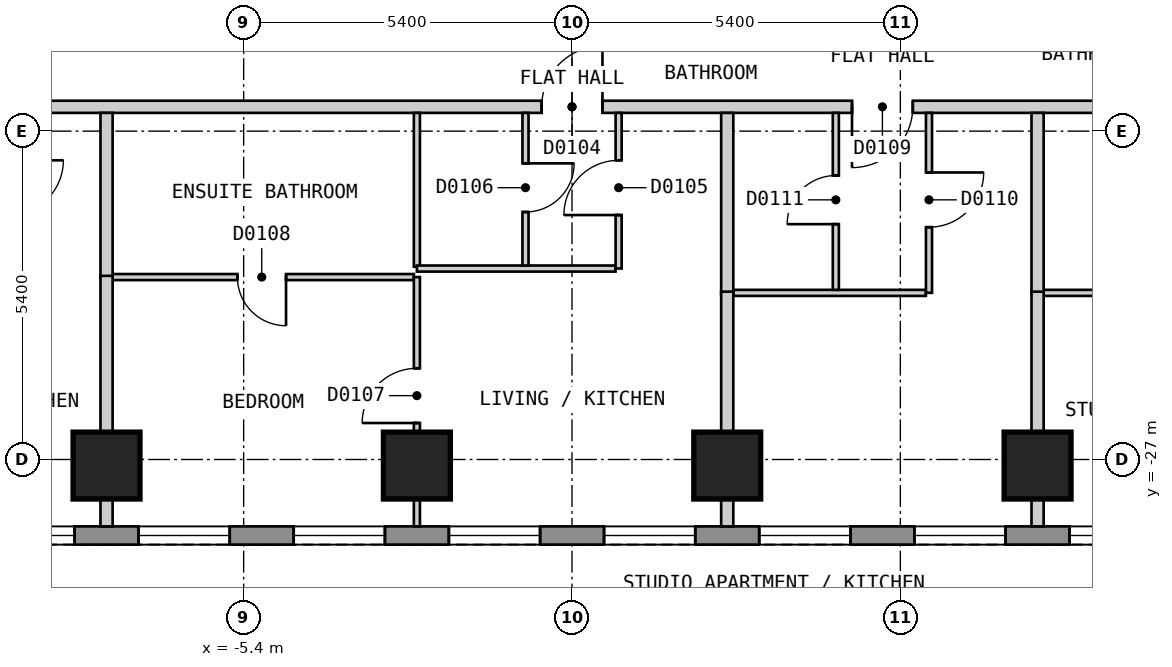
"""IFC4 building model, lengths in metres.
Left out: names, types, materials, properties, quantities, classifications, styles, units other than length and angle.
Written with IfcOpenShell. Run it as: python <this file> out.ifc"""

import sys

from ifc_helpers import new_model, si_unit, direction, frame, frame_2d, origin, origin_2d, place, context, subcontext, project, spatial, polyline, rectangle, outline, extrude, element, fill, save


model = new_model("IFC4")
c1 = context("Model", 3, precision=1e-05, world=origin(), true_north=direction((0.0, 1.0)))
c2 = subcontext(c1, "Body", "Model", "MODEL_VIEW")
j1 = project(units=[si_unit("LENGTHUNIT", "METRE"), si_unit("PLANEANGLEUNIT", "RADIAN")], contexts=[c1])
p1 = place(None, origin())
s1 = spatial("IfcSite", under=j1, at=p1, CompositionType="ELEMENT")
p2 = place(p1, origin())
s2 = spatial("IfcBuilding", under=s1, at=p2, CompositionType="ELEMENT")
p3 = place(p2, frame((0.0, 0.0, 29.4)))
s3 = spatial("IfcBuildingStorey", under=s2, at=p3, CompositionType="ELEMENT", Elevation=29.4)
for number, where, z_axis, x_axis in (
    (1, (-7.655, -27.1, 0.0), (0.0, 0.0, 1.0), (1.0, 0.0, 0.0)),
    (2, (-2.551, -27.1, 0.0), (0.0, 0.0, 1.0), (1.0, 0.0, 0.0)),
    (3, (2.553, -27.1, 0.0), (0.0, 0.0, 1.0), (1.0, 0.0, 0.0)),
    (4, (7.657, -27.1, 0.0), (0.0, 0.0, 1.0), (1.0, 0.0, 0.0)),
):
    element("IfcColumn", number, at=place(p3, frame(where, z_axis=z_axis, x_axis=x_axis)), inside=s3, PredefinedType="COLUMN", context=c2, shape_type="SweptSolid", body=[
        extrude(rectangle(XDim=1.1, YDim=1.1, at=origin_2d()), origin(), (0.0, 0.0, 1.0), 3.0),
    ])
p4 = place(p3, frame((-13.51, -28.25, 0.0), z_axis=(0.0, 0.0, 1.0), x_axis=(1.0, 0.0, 0.0)))
e5 = element("IfcWall", 5, at=p4, inside=s3, PredefinedType="SOLIDWALL", context=c2, shape_type="SweptSolid", body=[
    extrude(outline(polyline([(0.0, -0.15), (27.02, -0.15), (26.94, 0.15), (0.08, 0.15), (0.0, -0.15)])), origin(), (0.0, 0.0, 1.0), 2.7),
])
p5 = place(p4, frame((1.277, 0.0, 0.15)))
e6 = element("IfcOpeningElement", 6, at=p5, cuts=e5, PredefinedType="OPENING", context=c2, shape_type="SweptSolid", body=[
    extrude(rectangle(XDim=1.5, YDim=2.1, at=frame_2d((0.75, 1.05))), frame((0.0, 0.16, 0.0), z_axis=(0.0, -1.0, 0.0), x_axis=(1.0, 0.0, 0.0)), (0.0, 0.0, 1.0), 0.32),
])
p6 = place(p4, frame((3.829, 0.0, 0.15)))
e7 = element("IfcOpeningElement", 7, at=p6, cuts=e5, PredefinedType="OPENING", context=c2, shape_type="SweptSolid", body=[
    extrude(rectangle(XDim=1.5, YDim=2.1, at=frame_2d((0.75, 1.05))), frame((0.0, 0.16, 0.0), z_axis=(0.0, -1.0, 0.0), x_axis=(1.0, 0.0, 0.0)), (0.0, 0.0, 1.0), 0.32),
])
p7 = place(p4, frame((6.381, 0.0, 0.15)))
e8 = element("IfcOpeningElement", 8, at=p7, cuts=e5, PredefinedType="OPENING", context=c2, shape_type="SweptSolid", body=[
    extrude(rectangle(XDim=1.5, YDim=2.1, at=frame_2d((0.75, 1.05))), frame((0.0, 0.16, 0.0), z_axis=(0.0, -1.0, 0.0), x_axis=(1.0, 0.0, 0.0)), (0.0, 0.0, 1.0), 0.32),
])
p8 = place(p4, frame((8.933, 0.0, 0.15)))
e9 = element("IfcOpeningElement", 9, at=p8, cuts=e5, PredefinedType="OPENING", context=c2, shape_type="SweptSolid", body=[
    extrude(rectangle(XDim=1.5, YDim=2.1, at=frame_2d((0.75, 1.05))), frame((0.0, 0.16, 0.0), z_axis=(0.0, -1.0, 0.0), x_axis=(1.0, 0.0, 0.0)), (0.0, 0.0, 1.0), 0.32),
])
p9 = place(p4, frame((11.485, 0.0, 0.15)))
e10 = element("IfcOpeningElement", 10, at=p9, cuts=e5, PredefinedType="OPENING", context=c2, shape_type="SweptSolid", body=[
    extrude(rectangle(XDim=1.5, YDim=2.1, at=frame_2d((0.75, 1.05))), frame((0.0, 0.16, 0.0), z_axis=(0.0, -1.0, 0.0), x_axis=(1.0, 0.0, 0.0)), (0.0, 0.0, 1.0), 0.32),
])
p10 = place(p4, frame((14.037, 0.0, 0.15)))
e11 = element("IfcOpeningElement", 11, at=p10, cuts=e5, PredefinedType="OPENING", context=c2, shape_type="SweptSolid", body=[
    extrude(rectangle(XDim=1.5, YDim=2.1, at=frame_2d((0.75, 1.05))), frame((0.0, 0.16, 0.0), z_axis=(0.0, -1.0, 0.0), x_axis=(1.0, 0.0, 0.0)), (0.0, 0.0, 1.0), 0.32),
])
p11 = place(p4, frame((16.589, 0.0, 0.15)))
e12 = element("IfcOpeningElement", 12, at=p11, cuts=e5, PredefinedType="OPENING", context=c2, shape_type="SweptSolid", body=[
    extrude(rectangle(XDim=1.5, YDim=2.1, at=frame_2d((0.75, 1.05))), frame((0.0, 0.16, 0.0), z_axis=(0.0, -1.0, 0.0), x_axis=(1.0, 0.0, 0.0)), (0.0, 0.0, 1.0), 0.32),
])
p12 = place(p4, frame((19.141, 0.0, 0.15)))
e13 = element("IfcOpeningElement", 13, at=p12, cuts=e5, PredefinedType="OPENING", context=c2, shape_type="SweptSolid", body=[
    extrude(rectangle(XDim=1.5, YDim=2.1, at=frame_2d((0.75, 1.05))), frame((0.0, 0.16, 0.0), z_axis=(0.0, -1.0, 0.0), x_axis=(1.0, 0.0, 0.0)), (0.0, 0.0, 1.0), 0.32),
])
p13 = place(p4, frame((21.693, 0.0, 0.15)))
e14 = element("IfcOpeningElement", 14, at=p13, cuts=e5, PredefinedType="OPENING", context=c2, shape_type="SweptSolid", body=[
    extrude(rectangle(XDim=1.5, YDim=2.1, at=frame_2d((0.75, 1.05))), frame((0.0, 0.16, 0.0), z_axis=(0.0, -1.0, 0.0), x_axis=(1.0, 0.0, 0.0)), (0.0, 0.0, 1.0), 0.32),
])
p14 = place(p4, frame((24.245, 0.0, 0.15)))
e15 = element("IfcOpeningElement", 15, at=p14, cuts=e5, PredefinedType="OPENING", context=c2, shape_type="SweptSolid", body=[
    extrude(rectangle(XDim=1.5, YDim=2.1, at=frame_2d((0.75, 1.05))), frame((0.0, 0.16, 0.0), z_axis=(0.0, -1.0, 0.0), x_axis=(1.0, 0.0, 0.0)), (0.0, 0.0, 1.0), 0.32),
])
p15 = place(p3, frame((-15.4, -21.2, 0.0), z_axis=(0.0, 0.0, 1.0), x_axis=(1.0, 0.0, 0.0)))
e16 = element("IfcWall", 16, at=p15, inside=s3, PredefinedType="PARTITIONING", context=c2, shape_type="SweptSolid", body=[
    extrude(rectangle(XDim=30.799, YDim=0.2, at=frame_2d((15.399, 0.0))), origin(), (0.0, 0.0, 1.0), 2.7),
])
p16 = place(p15, frame((4.985, 0.0, 0.0)))
e17 = element("IfcOpeningElement", 17, at=p16, cuts=e16, PredefinedType="OPENING", context=c2, shape_type="SweptSolid", body=[
    extrude(rectangle(XDim=0.9, YDim=2.1, at=frame_2d((0.45, 1.05))), frame((0.0, 0.11, 0.0), z_axis=(0.0, -1.0, 0.0), x_axis=(1.0, 0.0, 0.0)), (0.0, 0.0, 1.0), 0.22),
])
p17 = place(p15, frame((14.901, 0.0, 0.0)))
e18 = element("IfcOpeningElement", 18, at=p17, cuts=e16, PredefinedType="OPENING", context=c2, shape_type="SweptSolid", body=[
    extrude(rectangle(XDim=1.0, YDim=2.1, at=frame_2d((0.5, 1.05))), frame((0.0, 0.11, 0.0), z_axis=(0.0, -1.0, 0.0), x_axis=(1.0, 0.0, 0.0)), (0.0, 0.0, 1.0), 0.22),
])
p18 = place(p15, frame((20.005, 0.0, 0.0)))
e19 = element("IfcOpeningElement", 19, at=p18, cuts=e16, PredefinedType="OPENING", context=c2, shape_type="SweptSolid", body=[
    extrude(rectangle(XDim=1.0, YDim=2.1, at=frame_2d((0.5, 1.05))), frame((0.0, 0.11, 0.0), z_axis=(0.0, -1.0, 0.0), x_axis=(1.0, 0.0, 0.0)), (0.0, 0.0, 1.0), 0.22),
])
p19 = place(p15, frame((24.916, 0.0, 0.0)))
e20 = element("IfcOpeningElement", 20, at=p19, cuts=e16, PredefinedType="OPENING", context=c2, shape_type="SweptSolid", body=[
    extrude(rectangle(XDim=0.9, YDim=2.1, at=frame_2d((0.45, 1.05))), frame((0.0, 0.11, 0.0), z_axis=(0.0, -1.0, 0.0), x_axis=(1.0, 0.0, 0.0)), (0.0, 0.0, 1.0), 0.22),
])
p20 = place(p3, frame((-2.551, -21.3, 0.0), z_axis=(0.0, 0.0, 1.0), x_axis=(0.0, -1.0, 0.0)))
e21 = element("IfcWall", 21, at=p20, inside=s3, PredefinedType="PARTITIONING", context=c2, shape_type="SweptSolid", body=[
    extrude(rectangle(XDim=2.53, YDim=0.1, at=frame_2d((1.265, 0.0))), origin(), (0.0, 0.0, 1.0), 2.7),
])
p21 = place(p3, frame((-2.551, -23.86, 0.0), z_axis=(0.0, 0.0, 1.0), x_axis=(1.0, 0.0, 0.0)))
e22 = element("IfcWall", 22, at=p21, inside=s3, PredefinedType="PARTITIONING", context=c2, shape_type="SweptSolid", body=[
    extrude(rectangle(XDim=3.267, YDim=0.1, at=frame_2d((1.634, 0.0))), origin(), (0.0, 0.0, 1.0), 2.7),
])
p22 = place(p3, frame((-7.555, -24.0, 0.0), z_axis=(0.0, 0.0, 1.0), x_axis=(1.0, 0.0, 0.0)))
e23 = element("IfcWall", 23, at=p22, inside=s3, PredefinedType="PARTITIONING", context=c2, shape_type="SweptSolid", body=[
    extrude(rectangle(XDim=4.954, YDim=0.1, at=frame_2d((2.477, 0.0))), origin(), (0.0, 0.0, 1.0), 2.7),
])
p23 = place(p22, frame((2.052, 0.0, 0.0)))
e24 = element("IfcOpeningElement", 24, at=p23, cuts=e23, PredefinedType="OPENING", context=c2, shape_type="SweptSolid", body=[
    extrude(rectangle(XDim=0.8, YDim=2.1, at=frame_2d((0.4, 1.05))), frame((0.0, 0.06, 0.0), z_axis=(0.0, -1.0, 0.0), x_axis=(1.0, 0.0, 0.0)), (0.0, 0.0, 1.0), 0.12),
])
p24 = place(p3, frame((2.653, -24.26, 0.0), z_axis=(0.0, 0.0, 1.0), x_axis=(1.0, 0.0, 0.0)))
e25 = element("IfcWall", 25, at=p24, inside=s3, PredefinedType="PARTITIONING", context=c2, shape_type="SweptSolid", body=[
    extrude(rectangle(XDim=3.167, YDim=0.1, at=frame_2d((1.583, 0.0))), origin(), (0.0, 0.0, 1.0), 2.7),
])
p25 = place(p3, frame((7.757, -24.26, 0.0), z_axis=(0.0, 0.0, 1.0), x_axis=(1.0, 0.0, 0.0)))
e26 = element("IfcWall", 26, at=p25, inside=s3, PredefinedType="PARTITIONING", context=c2, shape_type="SweptSolid", body=[
    extrude(rectangle(XDim=2.858, YDim=0.1, at=frame_2d((1.429, 0.0))), origin(), (0.0, 0.0, 1.0), 2.7),
])
p26 = place(p3, frame((4.339, -24.21, 0.0), z_axis=(0.0, 0.0, 1.0), x_axis=(0.0, 1.0, 0.0)))
e27 = element("IfcWall", 27, at=p26, inside=s3, PredefinedType="PARTITIONING", context=c2, shape_type="SweptSolid", body=[
    extrude(rectangle(XDim=2.91, YDim=0.1, at=frame_2d((1.455, 0.0))), origin(), (0.0, 0.0, 1.0), 2.7),
])
p27 = place(p26, frame((1.08, 0.0, 0.0)))
e28 = element("IfcOpeningElement", 28, at=p27, cuts=e27, PredefinedType="OPENING", context=c2, shape_type="SweptSolid", body=[
    extrude(rectangle(XDim=0.8, YDim=2.1, at=frame_2d((0.4, 1.05))), frame((0.0, 0.06, 0.0), z_axis=(0.0, -1.0, 0.0), x_axis=(1.0, 0.0, 0.0)), (0.0, 0.0, 1.0), 0.12),
])
p28 = place(p3, frame((5.871, -24.259, 0.0), z_axis=(0.0, 0.0, 1.0), x_axis=(0.0, 1.0, 0.0)))
e29 = element("IfcWall", 29, at=p28, inside=s3, PredefinedType="PARTITIONING", context=c2, shape_type="SweptSolid", body=[
    extrude(rectangle(XDim=2.959, YDim=0.1, at=frame_2d((1.479, 0.0))), origin(), (0.0, 0.0, 1.0), 2.7),
])
p29 = place(p28, frame((1.079, 0.0, 0.0)))
e30 = element("IfcOpeningElement", 30, at=p29, cuts=e29, PredefinedType="OPENING", context=c2, shape_type="SweptSolid", body=[
    extrude(rectangle(XDim=0.9, YDim=2.1, at=frame_2d((0.45, 1.05))), frame((0.0, 0.06, 0.0), z_axis=(0.0, -1.0, 0.0), x_axis=(1.0, 0.0, 0.0)), (0.0, 0.0, 1.0), 0.12),
])
p30 = place(p3, frame((0.767, -23.859, 0.0), z_axis=(0.0, 0.0, 1.0), x_axis=(0.0, 1.0, 0.0)))
e31 = element("IfcWall", 31, at=p30, inside=s3, PredefinedType="PARTITIONING", context=c2, shape_type="SweptSolid", body=[
    extrude(rectangle(XDim=2.559, YDim=0.1, at=frame_2d((1.279, 0.0))), origin(), (0.0, 0.0, 1.0), 2.7),
])
p31 = place(p30, frame((0.879, 0.0, 0.0)))
e32 = element("IfcOpeningElement", 32, at=p31, cuts=e31, PredefinedType="OPENING", context=c2, shape_type="SweptSolid", body=[
    extrude(rectangle(XDim=0.9, YDim=2.1, at=frame_2d((0.45, 1.05))), frame((0.0, 0.06, 0.0), z_axis=(0.0, -1.0, 0.0), x_axis=(1.0, 0.0, 0.0)), (0.0, 0.0, 1.0), 0.12),
])
p32 = place(p3, frame((-0.765, -23.81, 0.0), z_axis=(0.0, 0.0, 1.0), x_axis=(0.0, 1.0, 0.0)))
e33 = element("IfcWall", 33, at=p32, inside=s3, PredefinedType="PARTITIONING", context=c2, shape_type="SweptSolid", body=[
    extrude(rectangle(XDim=2.51, YDim=0.1, at=frame_2d((1.255, 0.0))), origin(), (0.0, 0.0, 1.0), 2.7),
])
p33 = place(p32, frame((0.88, 0.0, 0.0)))
e34 = element("IfcOpeningElement", 34, at=p33, cuts=e33, PredefinedType="OPENING", context=c2, shape_type="SweptSolid", body=[
    extrude(rectangle(XDim=0.8, YDim=2.1, at=frame_2d((0.4, 1.05))), frame((0.0, 0.06, 0.0), z_axis=(0.0, -1.0, 0.0), x_axis=(1.0, 0.0, 0.0)), (0.0, 0.0, 1.0), 0.12),
])
p34 = place(p3, frame((-2.551, -28.1, 0.0), z_axis=(0.0, 0.0, 1.0), x_axis=(0.0, 1.0, 0.0)))
e35 = element("IfcWall", 35, at=p34, inside=s3, PredefinedType="PARTITIONING", context=c2, shape_type="SweptSolid", body=[
    extrude(rectangle(XDim=4.1, YDim=0.1, at=frame_2d((2.05, 0.0))), origin(), (0.0, 0.0, 1.0), 2.7),
])
p35 = place(p34, frame((1.7, 0.0, 0.0)))
e36 = element("IfcOpeningElement", 36, at=p35, cuts=e35, PredefinedType="OPENING", context=c2, shape_type="SweptSolid", body=[
    extrude(rectangle(XDim=0.9, YDim=2.1, at=frame_2d((0.45, 1.05))), frame((0.0, 0.06, 0.0), z_axis=(0.0, -1.0, 0.0), x_axis=(1.0, 0.0, 0.0)), (0.0, 0.0, 1.0), 0.12),
])
p36 = place(p3, frame((-7.655, -21.3, 0.0), z_axis=(0.0, 0.0, 1.0), x_axis=(0.0, -1.0, 0.0)))
e37 = element("IfcWall", 37, at=p36, inside=s3, PredefinedType="PARTITIONING", context=c2, shape_type="SweptSolid", body=[
    extrude(rectangle(XDim=2.72, YDim=0.2, at=frame_2d((1.36, 0.0))), origin(), (0.0, 0.0, 1.0), 2.7),
])
for number, where, z_axis, x_axis in (
    (38, (7.657, -21.3, 0.0), (0.0, 0.0, 1.0), (0.0, -1.0, 0.0)),
    (39, (2.553, -21.3, 0.0), (0.0, 0.0, 1.0), (0.0, -1.0, 0.0)),
):
    element("IfcWall", number, at=place(p3, frame(where, z_axis=z_axis, x_axis=x_axis)), inside=s3, PredefinedType="PARTITIONING", context=c2, shape_type="SweptSolid", body=[
        extrude(rectangle(XDim=2.98, YDim=0.2, at=frame_2d((1.49, 0.0))), origin(), (0.0, 0.0, 1.0), 2.7),
    ])
for number, where, z_axis, x_axis in (
    (40, (7.657, -28.1, 0.0), (0.0, 0.0, 1.0), (0.0, 1.0, 0.0)),
    (41, (2.553, -28.1, 0.0), (0.0, 0.0, 1.0), (0.0, 1.0, 0.0)),
):
    element("IfcWall", number, at=place(p3, frame(where, z_axis=z_axis, x_axis=x_axis)), inside=s3, PredefinedType="PARTITIONING", context=c2, shape_type="SweptSolid", body=[
        extrude(rectangle(XDim=3.86, YDim=0.2, at=frame_2d((1.93, 0.0))), origin(), (0.0, 0.0, 1.0), 2.7),
    ])
p37 = place(p3, frame((-7.655, -28.1, 0.0), z_axis=(0.0, 0.0, 1.0), x_axis=(0.0, 1.0, 0.0)))
e42 = element("IfcWall", 42, at=p37, inside=s3, PredefinedType="PARTITIONING", context=c2, shape_type="SweptSolid", body=[
    extrude(rectangle(XDim=4.12, YDim=0.2, at=frame_2d((2.06, 0.0))), origin(), (0.0, 0.0, 1.0), 2.7),
])
p38 = place(p6, origin())
e43 = element("IfcWindow", 43, at=p38, inside=s3, PartitioningType="SINGLE_PANEL", PredefinedType="WINDOW", context=c2, shape_type="SweptSolid", body=[
    extrude(rectangle(XDim=1.5, YDim=2.1, at=frame_2d((0.75, 1.05))), frame((0.0, 0.03, 0.0), z_axis=(0.0, -1.0, 0.0), x_axis=(1.0, 0.0, 0.0)), (0.0, 0.0, 1.0), 0.06),
])
fill(e7, e43)
p39 = place(p7, origin())
e44 = element("IfcWindow", 44, at=p39, inside=s3, PartitioningType="SINGLE_PANEL", PredefinedType="WINDOW", context=c2, shape_type="SweptSolid", body=[
    extrude(rectangle(XDim=1.5, YDim=2.1, at=frame_2d((0.75, 1.05))), frame((0.0, 0.03, 0.0), z_axis=(0.0, -1.0, 0.0), x_axis=(1.0, 0.0, 0.0)), (0.0, 0.0, 1.0), 0.06),
])
fill(e8, e44)
p40 = place(p8, origin())
e45 = element("IfcWindow", 45, at=p40, inside=s3, PartitioningType="SINGLE_PANEL", PredefinedType="WINDOW", context=c2, shape_type="SweptSolid", body=[
    extrude(rectangle(XDim=1.5, YDim=2.1, at=frame_2d((0.75, 1.05))), frame((0.0, 0.03, 0.0), z_axis=(0.0, -1.0, 0.0), x_axis=(1.0, 0.0, 0.0)), (0.0, 0.0, 1.0), 0.06),
])
fill(e9, e45)
p41 = place(p9, origin())
e46 = element("IfcWindow", 46, at=p41, inside=s3, PartitioningType="SINGLE_PANEL", PredefinedType="WINDOW", context=c2, shape_type="SweptSolid", body=[
    extrude(rectangle(XDim=1.5, YDim=2.1, at=frame_2d((0.75, 1.05))), frame((0.0, 0.03, 0.0), z_axis=(0.0, -1.0, 0.0), x_axis=(1.0, 0.0, 0.0)), (0.0, 0.0, 1.0), 0.06),
])
fill(e10, e46)
p42 = place(p10, origin())
e47 = element("IfcWindow", 47, at=p42, inside=s3, PartitioningType="SINGLE_PANEL", PredefinedType="WINDOW", context=c2, shape_type="SweptSolid", body=[
    extrude(rectangle(XDim=1.5, YDim=2.1, at=frame_2d((0.75, 1.05))), frame((0.0, 0.03, 0.0), z_axis=(0.0, -1.0, 0.0), x_axis=(1.0, 0.0, 0.0)), (0.0, 0.0, 1.0), 0.06),
])
fill(e11, e47)
p43 = place(p11, origin())
e48 = element("IfcWindow", 48, at=p43, inside=s3, PartitioningType="SINGLE_PANEL", PredefinedType="WINDOW", context=c2, shape_type="SweptSolid", body=[
    extrude(rectangle(XDim=1.5, YDim=2.1, at=frame_2d((0.75, 1.05))), frame((0.0, 0.03, 0.0), z_axis=(0.0, -1.0, 0.0), x_axis=(1.0, 0.0, 0.0)), (0.0, 0.0, 1.0), 0.06),
])
fill(e12, e48)
p44 = place(p12, origin())
e49 = element("IfcWindow", 49, at=p44, inside=s3, PartitioningType="SINGLE_PANEL", PredefinedType="WINDOW", context=c2, shape_type="SweptSolid", body=[
    extrude(rectangle(XDim=1.5, YDim=2.1, at=frame_2d((0.75, 1.05))), frame((0.0, 0.03, 0.0), z_axis=(0.0, -1.0, 0.0), x_axis=(1.0, 0.0, 0.0)), (0.0, 0.0, 1.0), 0.06),
])
fill(e13, e49)
p45 = place(p13, origin())
e50 = element("IfcWindow", 50, at=p45, inside=s3, PartitioningType="SINGLE_PANEL", PredefinedType="WINDOW", context=c2, shape_type="SweptSolid", body=[
    extrude(rectangle(XDim=1.5, YDim=2.1, at=frame_2d((0.75, 1.05))), frame((0.0, 0.03, 0.0), z_axis=(0.0, -1.0, 0.0), x_axis=(1.0, 0.0, 0.0)), (0.0, 0.0, 1.0), 0.06),
])
fill(e14, e50)
p46 = place(p17, origin())
e51 = element("IfcDoor", 51, at=p46, inside=s3, OperationType="SINGLE_SWING_RIGHT", PredefinedType="DOOR", context=c2, shape_type="SweptSolid", body=[
    extrude(rectangle(XDim=1.0, YDim=2.1, at=frame_2d((0.5, 1.05))), frame((0.0, 0.025, 0.0), z_axis=(0.0, -1.0, 0.0), x_axis=(1.0, 0.0, 0.0)), (0.0, 0.0, 1.0), 0.05),
])
fill(e18, e51)
p47 = place(p31, origin())
e52 = element("IfcDoor", 52, at=p47, inside=s3, OperationType="SINGLE_SWING_LEFT", PredefinedType="DOOR", context=c2, shape_type="SweptSolid", body=[
    extrude(rectangle(XDim=0.9, YDim=2.1, at=frame_2d((0.45, 1.05))), frame((0.0, 0.025, 0.0), z_axis=(0.0, -1.0, 0.0), x_axis=(1.0, 0.0, 0.0)), (0.0, 0.0, 1.0), 0.05),
])
fill(e32, e52)
p48 = place(p33, origin())
e53 = element("IfcDoor", 53, at=p48, inside=s3, OperationType="SINGLE_SWING_RIGHT", PredefinedType="DOOR", context=c2, shape_type="SweptSolid", body=[
    extrude(rectangle(XDim=0.8, YDim=2.1, at=frame_2d((0.4, 1.05))), frame((0.0, 0.025, 0.0), z_axis=(0.0, -1.0, 0.0), x_axis=(1.0, 0.0, 0.0)), (0.0, 0.0, 1.0), 0.05),
])
fill(e34, e53)
p49 = place(p35, origin())
e54 = element("IfcDoor", 54, at=p49, inside=s3, OperationType="SINGLE_SWING_LEFT", PredefinedType="DOOR", context=c2, shape_type="SweptSolid", body=[
    extrude(rectangle(XDim=0.9, YDim=2.1, at=frame_2d((0.45, 1.05))), frame((0.0, 0.025, 0.0), z_axis=(0.0, -1.0, 0.0), x_axis=(1.0, 0.0, 0.0)), (0.0, 0.0, 1.0), 0.05),
])
fill(e36, e54)
p50 = place(p23, origin())
e55 = element("IfcDoor", 55, at=p50, inside=s3, OperationType="SINGLE_SWING_RIGHT", PredefinedType="DOOR", context=c2, shape_type="SweptSolid", body=[
    extrude(rectangle(XDim=0.8, YDim=2.1, at=frame_2d((0.4, 1.05))), frame((0.0, 0.025, 0.0), z_axis=(0.0, -1.0, 0.0), x_axis=(1.0, 0.0, 0.0)), (0.0, 0.0, 1.0), 0.05),
])
fill(e24, e55)
p51 = place(p18, origin())
e56 = element("IfcDoor", 56, at=p51, inside=s3, OperationType="SINGLE_SWING_LEFT", PredefinedType="DOOR", context=c2, shape_type="SweptSolid", body=[
    extrude(rectangle(XDim=1.0, YDim=2.1, at=frame_2d((0.5, 1.05))), frame((0.0, 0.025, 0.0), z_axis=(0.0, -1.0, 0.0), x_axis=(1.0, 0.0, 0.0)), (0.0, 0.0, 1.0), 0.05),
])
fill(e19, e56)
p52 = place(p29, origin())
e57 = element("IfcDoor", 57, at=p52, inside=s3, OperationType="SINGLE_SWING_RIGHT", PredefinedType="DOOR", context=c2, shape_type="SweptSolid", body=[
    extrude(rectangle(XDim=0.9, YDim=2.1, at=frame_2d((0.45, 1.05))), frame((0.0, 0.025, 0.0), z_axis=(0.0, -1.0, 0.0), x_axis=(1.0, 0.0, 0.0)), (0.0, 0.0, 1.0), 0.05),
])
fill(e30, e57)
p53 = place(p27, origin())
e58 = element("IfcDoor", 58, at=p53, inside=s3, OperationType="SINGLE_SWING_LEFT", PredefinedType="DOOR", context=c2, shape_type="SweptSolid", body=[
    extrude(rectangle(XDim=0.8, YDim=2.1, at=frame_2d((0.4, 1.05))), frame((0.0, 0.025, 0.0), z_axis=(0.0, -1.0, 0.0), x_axis=(1.0, 0.0, 0.0)), (0.0, 0.0, 1.0), 0.05),
])
fill(e28, e58)
save(model, sys.argv[1])
